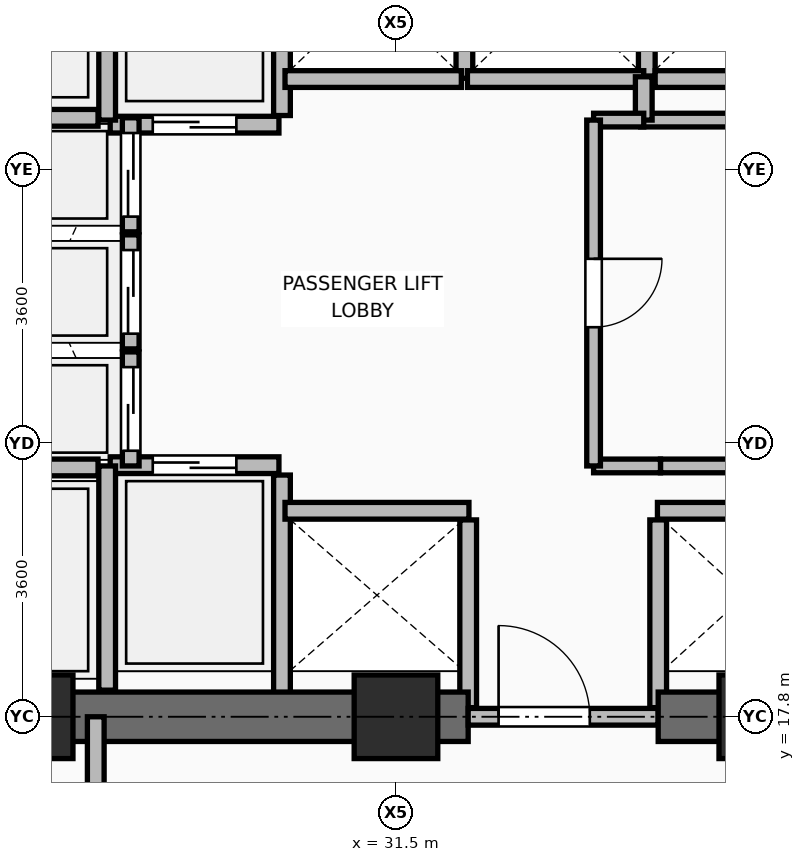
"""IFC4 building model, lengths in metres.
Left out: names, types, materials, properties, quantities, classifications, styles, units other than length and angle.
Written with IfcOpenShell. Run it as: python <this file> out.ifc"""

import sys

from ifc_helpers import new_model, si_unit, direction, frame, frame_2d, origin, origin_2d, place, context, subcontext, project, spatial, rectangle, extrude, element, fill, save


model = new_model("IFC4")
c1 = context("Model", 3, precision=1e-05, world=origin(), true_north=direction((0.0, 1.0)))
c2 = subcontext(c1, "Body", "Model", "MODEL_VIEW")
j1 = project(units=[si_unit("LENGTHUNIT", "METRE"), si_unit("PLANEANGLEUNIT", "RADIAN")], contexts=[c1])
p1 = place(None, origin())
s1 = spatial("IfcSite", under=j1, at=p1, CompositionType="ELEMENT")
p2 = place(p1, origin())
s2 = spatial("IfcBuilding", under=s1, at=p2, CompositionType="ELEMENT")
p3 = place(p2, frame((0.0, 0.0, 60.75)))
s3 = spatial("IfcBuildingStorey", under=s2, at=p3, CompositionType="ELEMENT", Elevation=60.75)
for number, where, z_axis, x_axis in (
    (1, (26.7, 17.8, 0.0), (0.0, 0.0, 1.0), (1.0, 0.0, 0.0)),
    (2, (31.5, 17.8, 0.0), (0.0, 0.0, 1.0), (1.0, 0.0, 0.0)),
    (3, (36.3, 17.8, 0.0), (0.0, 0.0, 1.0), (1.0, 0.0, 0.0)),
):
    element("IfcColumn", number, at=place(p3, frame(where, z_axis=z_axis, x_axis=x_axis)), inside=s3, PredefinedType="COLUMN", context=c2, shape_type="SweptSolid", body=[
        extrude(rectangle(XDim=1.1, YDim=1.1, at=origin_2d()), origin(), (0.0, 0.0, 1.0), 3.75),
    ])
p4 = place(p3, frame((30.0, 18.08, 0.0), z_axis=(0.0, 0.0, 1.0), x_axis=(0.0, 1.0, 0.0)))
e4 = element("IfcWall", 4, at=p4, inside=s3, PredefinedType="PARTITIONING", context=c2, shape_type="SweptSolid", body=[
    extrude(rectangle(XDim=2.9, YDim=0.22, at=frame_2d((1.45, 0.0))), origin(), (0.0, 0.0, 1.0), 3.545),
])
for number, where, z_axis, x_axis in (
    (5, (32.45, 17.92, 0.0), (0.0, 0.0, 1.0), (0.0, 1.0, 0.0)),
    (6, (34.95, 17.92, 0.0), (0.0, 0.0, 1.0), (0.0, 1.0, 0.0)),
):
    element("IfcWall", number, at=place(p3, frame(where, z_axis=z_axis, x_axis=x_axis)), inside=s3, PredefinedType="PARTITIONING", context=c2, shape_type="SweptSolid", body=[
        extrude(rectangle(XDim=2.47, YDim=0.22, at=frame_2d((1.235, 0.0))), origin(), (0.0, 0.0, 1.0), 2.928),
    ])
p5 = place(p3, frame((30.0, 25.71, 0.0), z_axis=(0.0, 0.0, 1.0), x_axis=(0.0, 1.0, 0.0)))
e7 = element("IfcWall", 7, at=p5, inside=s3, PredefinedType="PARTITIONING", context=c2, shape_type="SweptSolid", body=[
    extrude(rectangle(XDim=2.73, YDim=0.22, at=frame_2d((1.365, 0.0))), origin(), (0.0, 0.0, 1.0), 3.545),
])
p6 = place(p3, frame((32.4, 26.2, 0.0), z_axis=(0.0, 0.0, 1.0), x_axis=(0.0, 1.0, 0.0)))
e8 = element("IfcWall", 8, at=p6, inside=s3, PredefinedType="PARTITIONING", context=c2, shape_type="SweptSolid", body=[
    extrude(rectangle(XDim=2.24, YDim=0.22, at=frame_2d((1.12, 0.0))), origin(), (0.0, 0.0, 1.0), 3.545),
])
p7 = place(p3, frame((34.8, 26.23, 0.0), z_axis=(0.0, 0.0, 1.0), x_axis=(0.0, 1.0, 0.0)))
e9 = element("IfcWall", 9, at=p7, inside=s3, PredefinedType="PARTITIONING", context=c2, shape_type="SweptSolid", body=[
    extrude(rectangle(XDim=2.21, YDim=0.22, at=frame_2d((1.105, 0.0))), origin(), (0.0, 0.0, 1.0), 3.545),
])
p8 = place(p3, frame((34.91, 26.19, 0.0), z_axis=(0.0, 0.0, 1.0), x_axis=(1.0, 0.0, 0.0)))
e10 = element("IfcWall", 10, at=p8, inside=s3, PredefinedType="PARTITIONING", context=c2, shape_type="SweptSolid", body=[
    extrude(rectangle(XDim=2.14, YDim=0.22, at=frame_2d((1.07, 0.0))), origin(), (0.0, 0.0, 1.0), 3.545),
])
p9 = place(p3, frame((25.55, 17.8, 0.0), z_axis=(0.0, 0.0, 1.0), x_axis=(1.0, 0.0, 0.0)))
e11 = element("IfcWall", 11, at=p9, inside=s3, PredefinedType="SHEAR", context=c2, shape_type="SweptSolid", body=[
    extrude(rectangle(XDim=6.9, YDim=0.65, at=frame_2d((3.45, 0.0))), origin(), (0.0, 0.0, 1.0), 3.57),
])
p10 = place(p3, frame((32.45, 17.8, 0.0), z_axis=(0.0, 0.0, 1.0), x_axis=(1.0, 0.0, 0.0)))
e12 = element("IfcWall", 12, at=p10, inside=s3, PredefinedType="PARTITIONING", context=c2, shape_type="SweptSolid", body=[
    extrude(rectangle(XDim=2.5, YDim=0.22, at=frame_2d((1.25, 0.0))), origin(), (0.0, 0.0, 1.0), 2.928),
])
p11 = place(p10, frame((0.4, 0.0, 0.0)))
e13 = element("IfcOpeningElement", 13, at=p11, cuts=e12, PredefinedType="OPENING", context=c2, shape_type="SweptSolid", body=[
    extrude(rectangle(XDim=1.2, YDim=2.1, at=frame_2d((0.6, 1.05))), frame((0.0, 0.12, 0.0), z_axis=(0.0, -1.0, 0.0), x_axis=(1.0, 0.0, 0.0)), (0.0, 0.0, 1.0), 0.24),
])
p12 = place(p3, frame((34.95, 17.8, 0.0), z_axis=(0.0, 0.0, 1.0), x_axis=(1.0, 0.0, 0.0)))
e14 = element("IfcWall", 14, at=p12, inside=s3, PredefinedType="SHEAR", context=c2, shape_type="SweptSolid", body=[
    extrude(rectangle(XDim=6.475, YDim=0.65, at=frame_2d((3.238, 0.0))), origin(), (0.0, 0.0, 1.0), 3.57),
])
p13 = place(p3, frame((27.74, 21.11, 0.0), z_axis=(0.0, 0.0, 1.0), x_axis=(1.0, 0.0, 0.0)))
e15 = element("IfcWall", 15, at=p13, inside=s3, PredefinedType="PARTITIONING", context=c2, shape_type="SweptSolid", body=[
    extrude(rectangle(XDim=2.22, YDim=0.22, at=frame_2d((1.11, 0.0))), origin(), (0.0, 0.0, 1.0), 3.55),
])
p14 = place(p13, frame((0.56, 0.0, 0.0)))
e16 = element("IfcOpeningElement", 16, at=p14, cuts=e15, PredefinedType="OPENING", context=c2, shape_type="SweptSolid", body=[
    extrude(rectangle(XDim=1.1, YDim=2.2, at=frame_2d((0.55, 1.1))), frame((0.0, 0.12, 0.0), z_axis=(0.0, -1.0, 0.0), x_axis=(1.0, 0.0, 0.0)), (0.0, 0.0, 1.0), 0.24),
])
p15 = place(p3, frame((27.74, 25.59, 0.0), z_axis=(0.0, 0.0, 1.0), x_axis=(1.0, 0.0, 0.0)))
e17 = element("IfcWall", 17, at=p15, inside=s3, PredefinedType="PARTITIONING", context=c2, shape_type="SweptSolid", body=[
    extrude(rectangle(XDim=2.22, YDim=0.22, at=frame_2d((1.11, 0.0))), origin(), (0.0, 0.0, 1.0), 3.55),
])
p16 = place(p15, frame((0.56, 0.0, 0.0)))
e18 = element("IfcOpeningElement", 18, at=p16, cuts=e17, PredefinedType="OPENING", context=c2, shape_type="SweptSolid", body=[
    extrude(rectangle(XDim=1.1, YDim=2.2, at=frame_2d((0.55, 1.1))), frame((0.0, 0.12, 0.0), z_axis=(0.0, -1.0, 0.0), x_axis=(1.0, 0.0, 0.0)), (0.0, 0.0, 1.0), 0.24),
])
p17 = place(p3, frame((30.04, 20.51, 0.0), z_axis=(0.0, 0.0, 1.0), x_axis=(1.0, 0.0, 0.0)))
e19 = element("IfcWall", 19, at=p17, inside=s3, PredefinedType="PARTITIONING", context=c2, shape_type="SweptSolid", body=[
    extrude(rectangle(XDim=2.42, YDim=0.22, at=frame_2d((1.21, 0.0))), origin(), (0.0, 0.0, 1.0), 3.55),
])
p18 = place(p3, frame((34.94, 20.51, 0.0), z_axis=(0.0, 0.0, 1.0), x_axis=(1.0, 0.0, 0.0)))
e20 = element("IfcWall", 20, at=p18, inside=s3, PredefinedType="PARTITIONING", context=c2, shape_type="SweptSolid", body=[
    extrude(rectangle(XDim=2.24, YDim=0.22, at=frame_2d((1.12, 0.0))), origin(), (0.0, 0.0, 1.0), 3.55),
])
for number, where, z_axis, x_axis in (
    (21, (30.04, 26.19, 0.0), (0.0, 0.0, 1.0), (1.0, 0.0, 0.0)),
    (22, (32.44, 26.19, 0.0), (0.0, 0.0, 1.0), (1.0, 0.0, 0.0)),
):
    element("IfcWall", number, at=place(p3, frame(where, z_axis=z_axis, x_axis=x_axis)), inside=s3, PredefinedType="PARTITIONING", context=c2, shape_type="SweptSolid", body=[
        extrude(rectangle(XDim=2.32, YDim=0.22, at=frame_2d((1.16, 0.0))), origin(), (0.0, 0.0, 1.0), 3.55),
    ])
p19 = place(p3, frame((28.01, 21.1, 0.0), z_axis=(0.0, 0.0, 1.0), x_axis=(0.0, 1.0, 0.0)))
e23 = element("IfcWall", 23, at=p19, inside=s3, PredefinedType="PARTITIONING", context=c2, shape_type="SweptSolid", body=[
    extrude(rectangle(XDim=1.5, YDim=0.22, at=frame_2d((0.75, 0.0))), origin(), (0.0, 0.0, 1.0), 3.55),
])
p20 = place(p19, frame((0.2, 0.0, 0.0)))
e24 = element("IfcOpeningElement", 24, at=p20, cuts=e23, PredefinedType="OPENING", context=c2, shape_type="SweptSolid", body=[
    extrude(rectangle(XDim=1.1, YDim=2.2, at=frame_2d((0.55, 1.1))), frame((0.0, 0.12, 0.0), z_axis=(0.0, -1.0, 0.0), x_axis=(1.0, 0.0, 0.0)), (0.0, 0.0, 1.0), 0.24),
])
p21 = place(p3, frame((28.01, 22.64, 0.0), z_axis=(0.0, 0.0, 1.0), x_axis=(0.0, 1.0, 0.0)))
e25 = element("IfcWall", 25, at=p21, inside=s3, PredefinedType="PARTITIONING", context=c2, shape_type="SweptSolid", body=[
    extrude(rectangle(XDim=1.5, YDim=0.22, at=frame_2d((0.75, 0.0))), origin(), (0.0, 0.0, 1.0), 3.55),
])
p22 = place(p21, frame((0.2, 0.0, 0.0)))
e26 = element("IfcOpeningElement", 26, at=p22, cuts=e25, PredefinedType="OPENING", context=c2, shape_type="SweptSolid", body=[
    extrude(rectangle(XDim=1.1, YDim=2.2, at=frame_2d((0.55, 1.1))), frame((0.0, 0.12, 0.0), z_axis=(0.0, -1.0, 0.0), x_axis=(1.0, 0.0, 0.0)), (0.0, 0.0, 1.0), 0.24),
])
p23 = place(p3, frame((28.01, 24.18, 0.0), z_axis=(0.0, 0.0, 1.0), x_axis=(0.0, 1.0, 0.0)))
e27 = element("IfcWall", 27, at=p23, inside=s3, PredefinedType="PARTITIONING", context=c2, shape_type="SweptSolid", body=[
    extrude(rectangle(XDim=1.5, YDim=0.22, at=frame_2d((0.75, 0.0))), origin(), (0.0, 0.0, 1.0), 3.55),
])
p24 = place(p23, frame((0.2, 0.0, 0.0)))
e28 = element("IfcOpeningElement", 28, at=p24, cuts=e27, PredefinedType="OPENING", context=c2, shape_type="SweptSolid", body=[
    extrude(rectangle(XDim=1.1, YDim=2.2, at=frame_2d((0.55, 1.1))), frame((0.0, 0.12, 0.0), z_axis=(0.0, -1.0, 0.0), x_axis=(1.0, 0.0, 0.0)), (0.0, 0.0, 1.0), 0.24),
])
p25 = place(p3, frame((27.7, 18.15, 0.0), z_axis=(0.0, 0.0, 1.0), x_axis=(0.0, 1.0, 0.0)))
e29 = element("IfcWall", 29, at=p25, inside=s3, PredefinedType="PARTITIONING", context=c2, shape_type="SweptSolid", body=[
    extrude(rectangle(XDim=2.95, YDim=0.22, at=frame_2d((1.475, 0.0))), origin(), (0.0, 0.0, 1.0), 3.55),
])
p26 = place(p3, frame((27.7, 25.65, 0.0), z_axis=(0.0, 0.0, 1.0), x_axis=(0.0, 1.0, 0.0)))
e30 = element("IfcWall", 30, at=p26, inside=s3, PredefinedType="PARTITIONING", context=c2, shape_type="SweptSolid", body=[
    extrude(rectangle(XDim=3.0, YDim=0.22, at=frame_2d((1.5, 0.0))), origin(), (0.0, 0.0, 1.0), 3.55),
])
for number, where, z_axis, x_axis in (
    (31, (25.88, 21.08, 0.0), (0.0, 0.0, 1.0), (1.0, 0.0, 0.0)),
    (32, (25.88, 25.68, 0.0), (0.0, 0.0, 1.0), (1.0, 0.0, 0.0)),
):
    element("IfcWall", number, at=place(p3, frame(where, z_axis=z_axis, x_axis=x_axis)), inside=s3, PredefinedType="PARTITIONING", context=c2, shape_type="SweptSolid", body=[
        extrude(rectangle(XDim=1.7, YDim=0.22, at=frame_2d((0.85, 0.0))), origin(), (0.0, 0.0, 1.0), 3.55),
    ])
p27 = place(p3, frame((34.98, 21.1, 0.0), z_axis=(0.0, 0.0, 1.0), x_axis=(1.0, 0.0, 0.0)))
e33 = element("IfcWall", 33, at=p27, inside=s3, PredefinedType="PARTITIONING", context=c2, shape_type="SweptSolid", body=[
    extrude(rectangle(XDim=2.08, YDim=0.18, at=frame_2d((1.04, 0.0))), origin(), (0.0, 0.0, 1.0), 3.55),
])
p28 = place(p3, frame((34.72, 25.65, 0.0), z_axis=(0.0, 0.0, 1.0), x_axis=(1.0, 0.0, 0.0)))
e34 = element("IfcWall", 34, at=p28, inside=s3, PredefinedType="PARTITIONING", context=c2, shape_type="SweptSolid", body=[
    extrude(rectangle(XDim=2.34, YDim=0.18, at=frame_2d((1.17, 0.0))), origin(), (0.0, 0.0, 1.0), 3.55),
])
p29 = place(p3, frame((34.76, 25.65, 0.0), z_axis=(0.0, 0.0, 1.0), x_axis=(0.0, 1.0, 0.0)))
e35 = element("IfcWall", 35, at=p29, inside=s3, PredefinedType="PARTITIONING", context=c2, shape_type="SweptSolid", body=[
    extrude(rectangle(XDim=0.57, YDim=0.22, at=frame_2d((0.285, 0.0))), origin(), (0.0, 0.0, 1.0), 3.55),
])
p30 = place(p3, frame((34.1, 21.1, 0.0), z_axis=(0.0, 0.0, 1.0), x_axis=(1.0, 0.0, 0.0)))
e36 = element("IfcWall", 36, at=p30, inside=s3, PredefinedType="PARTITIONING", context=c2, shape_type="SweptSolid", body=[
    extrude(rectangle(XDim=0.88, YDim=0.18, at=frame_2d((0.44, 0.0))), origin(), (0.0, 0.0, 1.0), 3.55),
])
p31 = place(p3, frame((34.1, 25.65, 0.0), z_axis=(0.0, 0.0, 1.0), x_axis=(1.0, 0.0, 0.0)))
e37 = element("IfcWall", 37, at=p31, inside=s3, PredefinedType="PARTITIONING", context=c2, shape_type="SweptSolid", body=[
    extrude(rectangle(XDim=0.66, YDim=0.18, at=frame_2d((0.33, 0.0))), origin(), (0.0, 0.0, 1.0), 3.55),
])
p32 = place(p3, frame((34.1, 21.1, 0.0), z_axis=(0.0, 0.0, 1.0), x_axis=(0.0, 1.0, 0.0)))
e38 = element("IfcWall", 38, at=p32, inside=s3, PredefinedType="PARTITIONING", context=c2, shape_type="SweptSolid", body=[
    extrude(rectangle(XDim=4.55, YDim=0.18, at=frame_2d((2.275, 0.0))), origin(), (0.0, 0.0, 1.0), 3.55),
])
p33 = place(p32, frame((1.825, 0.0, 0.0)))
e39 = element("IfcOpeningElement", 39, at=p33, cuts=e38, PredefinedType="OPENING", context=c2, shape_type="SweptSolid", body=[
    extrude(rectangle(XDim=0.9, YDim=2.1, at=frame_2d((0.45, 1.05))), frame((0.0, 0.1, 0.0), z_axis=(0.0, -1.0, 0.0), x_axis=(1.0, 0.0, 0.0)), (0.0, 0.0, 1.0), 0.2),
])
p34 = place(p3, frame((27.55, 14.35, 0.0), z_axis=(0.0, 0.0, 1.0), x_axis=(0.0, 1.0, 0.0)))
e40 = element("IfcWall", 40, at=p34, inside=s3, PredefinedType="PARTITIONING", context=c2, shape_type="SweptSolid", body=[
    extrude(rectangle(XDim=3.45, YDim=0.22, at=frame_2d((1.725, 0.0))), origin(), (0.0, 0.0, 1.0), 2.928),
])
p35 = place(p34, frame((1.175, 0.0, 0.0)))
e41 = element("IfcOpeningElement", 41, at=p35, cuts=e40, PredefinedType="OPENING", context=c2, shape_type="SweptSolid", body=[
    extrude(rectangle(XDim=1.1, YDim=2.1, at=frame_2d((0.55, 1.05))), frame((0.0, 0.12, 0.0), z_axis=(0.0, -1.0, 0.0), x_axis=(1.0, 0.0, 0.0)), (0.0, 0.0, 1.0), 0.24),
])
p36 = place(p11, origin())
e42 = element("IfcDoor", 42, at=p36, inside=s3, OperationType="SINGLE_SWING_LEFT", PredefinedType="DOOR", context=c2, shape_type="SweptSolid", body=[
    extrude(rectangle(XDim=1.2, YDim=2.1, at=frame_2d((0.6, 1.05))), frame((0.0, 0.025, 0.0), z_axis=(0.0, -1.0, 0.0), x_axis=(1.0, 0.0, 0.0)), (0.0, 0.0, 1.0), 0.05),
])
fill(e13, e42)
p37 = place(p14, origin())
e43 = element("IfcDoor", 43, at=p37, inside=s3, OperationType="DOUBLE_DOOR_SLIDING", PredefinedType="DOOR", context=c2, shape_type="SweptSolid", body=[
    extrude(rectangle(XDim=1.1, YDim=2.2, at=frame_2d((0.55, 1.1))), frame((0.0, 0.025, 0.0), z_axis=(0.0, -1.0, 0.0), x_axis=(1.0, 0.0, 0.0)), (0.0, 0.0, 1.0), 0.05),
])
fill(e16, e43)
p38 = place(p16, frame((1.1, 0.0, 0.0), z_axis=(0.0, 0.0, 1.0), x_axis=(-1.0, 0.0, 0.0)))
e44 = element("IfcDoor", 44, at=p38, inside=s3, OperationType="DOUBLE_DOOR_SLIDING", PredefinedType="DOOR", context=c2, shape_type="SweptSolid", body=[
    extrude(rectangle(XDim=1.1, YDim=2.2, at=frame_2d((0.55, 1.1))), frame((0.0, 0.025, 0.0), z_axis=(0.0, -1.0, 0.0), x_axis=(1.0, 0.0, 0.0)), (0.0, 0.0, 1.0), 0.05),
])
fill(e18, e44)
p39 = place(p20, frame((1.1, 0.0, 0.0), z_axis=(0.0, 0.0, 1.0), x_axis=(-1.0, 0.0, 0.0)))
e45 = element("IfcDoor", 45, at=p39, inside=s3, OperationType="DOUBLE_DOOR_SLIDING", PredefinedType="DOOR", context=c2, shape_type="SweptSolid", body=[
    extrude(rectangle(XDim=1.1, YDim=2.2, at=frame_2d((0.55, 1.1))), frame((0.0, 0.025, 0.0), z_axis=(0.0, -1.0, 0.0), x_axis=(1.0, 0.0, 0.0)), (0.0, 0.0, 1.0), 0.05),
])
fill(e24, e45)
p40 = place(p22, frame((1.1, 0.0, 0.0), z_axis=(0.0, 0.0, 1.0), x_axis=(-1.0, 0.0, 0.0)))
e46 = element("IfcDoor", 46, at=p40, inside=s3, OperationType="DOUBLE_DOOR_SLIDING", PredefinedType="DOOR", context=c2, shape_type="SweptSolid", body=[
    extrude(rectangle(XDim=1.1, YDim=2.2, at=frame_2d((0.55, 1.1))), frame((0.0, 0.025, 0.0), z_axis=(0.0, -1.0, 0.0), x_axis=(1.0, 0.0, 0.0)), (0.0, 0.0, 1.0), 0.05),
])
fill(e26, e46)
p41 = place(p24, frame((1.1, 0.0, 0.0), z_axis=(0.0, 0.0, 1.0), x_axis=(-1.0, 0.0, 0.0)))
e47 = element("IfcDoor", 47, at=p41, inside=s3, OperationType="DOUBLE_DOOR_SLIDING", PredefinedType="DOOR", context=c2, shape_type="SweptSolid", body=[
    extrude(rectangle(XDim=1.1, YDim=2.2, at=frame_2d((0.55, 1.1))), frame((0.0, 0.025, 0.0), z_axis=(0.0, -1.0, 0.0), x_axis=(1.0, 0.0, 0.0)), (0.0, 0.0, 1.0), 0.05),
])
fill(e28, e47)
p42 = place(p33, frame((0.9, 0.0, 0.0), z_axis=(0.0, 0.0, 1.0), x_axis=(-1.0, 0.0, 0.0)))
e48 = element("IfcDoor", 48, at=p42, inside=s3, OperationType="SINGLE_SWING_LEFT", PredefinedType="DOOR", context=c2, shape_type="SweptSolid", body=[
    extrude(rectangle(XDim=0.9, YDim=2.1, at=frame_2d((0.45, 1.05))), frame((0.0, 0.025, 0.0), z_axis=(0.0, -1.0, 0.0), x_axis=(1.0, 0.0, 0.0)), (0.0, 0.0, 1.0), 0.05),
])
fill(e39, e48)
save(model, sys.argv[1])
